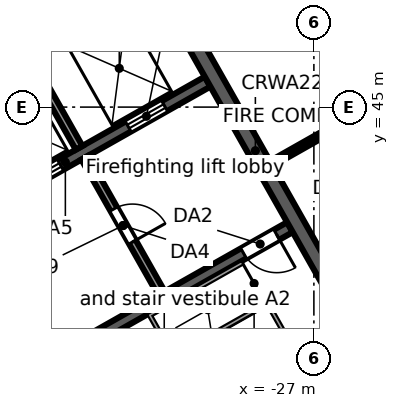
"""IFC4 building model, lengths in metres.
Left out: names, types, materials, properties, quantities, classifications, styles, units other than length and angle.
Written with IfcOpenShell. Run it as: python <this file> out.ifc"""

import sys

from ifc_helpers import new_model, si_unit, direction, frame, frame_2d, origin, place, context, subcontext, project, spatial, rectangle, extrude, element, fill, save


model = new_model("IFC4")
c1 = context("Model", 3, precision=1e-05, world=origin(), true_north=direction((0.0, 1.0)))
c2 = subcontext(c1, "Body", "Model", "MODEL_VIEW")
j1 = project(units=[si_unit("LENGTHUNIT", "METRE"), si_unit("PLANEANGLEUNIT", "RADIAN")], contexts=[c1])
p1 = place(None, origin())
s1 = spatial("IfcSite", under=j1, at=p1, CompositionType="ELEMENT")
p2 = place(p1, origin())
s2 = spatial("IfcBuilding", under=s1, at=p2, CompositionType="ELEMENT")
p3 = place(p2, frame((0.0, 0.0, 262.7)))
s3 = spatial("IfcBuildingStorey", under=s2, at=p3, CompositionType="ELEMENT", Elevation=262.7)
p4 = place(p3, frame((-58.732, 38.771, 0.0), z_axis=(0.0, 0.0, 1.0), x_axis=(0.870355615581, 0.492423702137, 0.0)))
e1 = element("IfcWall", 1, at=p4, inside=s3, PredefinedType="STANDARD", context=c2, shape_type="SweptSolid", body=[
    extrude(rectangle(XDim=64.052, YDim=0.25, at=frame_2d((32.026, 0.0))), origin(), (0.0, 0.0, 1.0), 3.52),
])
p5 = place(p4, frame((61.259, 0.0, 0.8)))
e2 = element("IfcOpeningElement", 2, at=p5, cuts=e1, PredefinedType="OPENING", context=c2, shape_type="SweptSolid", body=[
    extrude(rectangle(XDim=2.4, YDim=2.2, at=frame_2d((1.2, 1.1))), frame((0.0, 0.135, 0.0), z_axis=(0.0, -1.0, 0.0), x_axis=(1.0, 0.0, 0.0)), (0.0, 0.0, 1.0), 0.27),
])
p6 = place(p4, frame((58.216, 0.0, 0.8)))
e3 = element("IfcOpeningElement", 3, at=p6, cuts=e1, PredefinedType="OPENING", context=c2, shape_type="SweptSolid", body=[
    extrude(rectangle(XDim=2.4, YDim=2.2, at=frame_2d((1.2, 1.1))), frame((0.0, 0.135, 0.0), z_axis=(0.0, -1.0, 0.0), x_axis=(1.0, 0.0, 0.0)), (0.0, 0.0, 1.0), 0.27),
])
p7 = place(p4, frame((55.173, 0.0, 0.8)))
e4 = element("IfcOpeningElement", 4, at=p7, cuts=e1, PredefinedType="OPENING", context=c2, shape_type="SweptSolid", body=[
    extrude(rectangle(XDim=2.4, YDim=2.2, at=frame_2d((1.2, 1.1))), frame((0.0, 0.135, 0.0), z_axis=(0.0, -1.0, 0.0), x_axis=(1.0, 0.0, 0.0)), (0.0, 0.0, 1.0), 0.27),
])
p8 = place(p4, frame((52.129, 0.0, 0.8)))
e5 = element("IfcOpeningElement", 5, at=p8, cuts=e1, PredefinedType="OPENING", context=c2, shape_type="SweptSolid", body=[
    extrude(rectangle(XDim=2.4, YDim=2.2, at=frame_2d((1.2, 1.1))), frame((0.0, 0.135, 0.0), z_axis=(0.0, -1.0, 0.0), x_axis=(1.0, 0.0, 0.0)), (0.0, 0.0, 1.0), 0.27),
])
p9 = place(p4, frame((49.086, 0.0, 0.8)))
e6 = element("IfcOpeningElement", 6, at=p9, cuts=e1, PredefinedType="OPENING", context=c2, shape_type="SweptSolid", body=[
    extrude(rectangle(XDim=2.4, YDim=2.2, at=frame_2d((1.2, 1.1))), frame((0.0, 0.135, 0.0), z_axis=(0.0, -1.0, 0.0), x_axis=(1.0, 0.0, 0.0)), (0.0, 0.0, 1.0), 0.27),
])
p10 = place(p4, frame((46.043, 0.0, 0.8)))
e7 = element("IfcOpeningElement", 7, at=p10, cuts=e1, PredefinedType="OPENING", context=c2, shape_type="SweptSolid", body=[
    extrude(rectangle(XDim=2.4, YDim=2.2, at=frame_2d((1.2, 1.1))), frame((0.0, 0.135, 0.0), z_axis=(0.0, -1.0, 0.0), x_axis=(1.0, 0.0, 0.0)), (0.0, 0.0, 1.0), 0.27),
])
p11 = place(p4, frame((43.0, 0.0, 0.8)))
e8 = element("IfcOpeningElement", 8, at=p11, cuts=e1, PredefinedType="OPENING", context=c2, shape_type="SweptSolid", body=[
    extrude(rectangle(XDim=2.4, YDim=2.2, at=frame_2d((1.2, 1.1))), frame((0.0, 0.135, 0.0), z_axis=(0.0, -1.0, 0.0), x_axis=(1.0, 0.0, 0.0)), (0.0, 0.0, 1.0), 0.27),
])
p12 = place(p4, frame((39.956, 0.0, 0.8)))
e9 = element("IfcOpeningElement", 9, at=p12, cuts=e1, PredefinedType="OPENING", context=c2, shape_type="SweptSolid", body=[
    extrude(rectangle(XDim=2.4, YDim=2.2, at=frame_2d((1.2, 1.1))), frame((0.0, 0.135, 0.0), z_axis=(0.0, -1.0, 0.0), x_axis=(1.0, 0.0, 0.0)), (0.0, 0.0, 1.0), 0.27),
])
p13 = place(p4, frame((36.913, 0.0, 0.8)))
e10 = element("IfcOpeningElement", 10, at=p13, cuts=e1, PredefinedType="OPENING", context=c2, shape_type="SweptSolid", body=[
    extrude(rectangle(XDim=2.4, YDim=2.2, at=frame_2d((1.2, 1.1))), frame((0.0, 0.135, 0.0), z_axis=(0.0, -1.0, 0.0), x_axis=(1.0, 0.0, 0.0)), (0.0, 0.0, 1.0), 0.27),
])
p14 = place(p4, frame((33.87, 0.0, 0.8)))
e11 = element("IfcOpeningElement", 11, at=p14, cuts=e1, PredefinedType="OPENING", context=c2, shape_type="SweptSolid", body=[
    extrude(rectangle(XDim=2.4, YDim=2.2, at=frame_2d((1.2, 1.1))), frame((0.0, 0.135, 0.0), z_axis=(0.0, -1.0, 0.0), x_axis=(1.0, 0.0, 0.0)), (0.0, 0.0, 1.0), 0.27),
])
p15 = place(p4, frame((30.826, 0.0, 0.8)))
e12 = element("IfcOpeningElement", 12, at=p15, cuts=e1, PredefinedType="OPENING", context=c2, shape_type="SweptSolid", body=[
    extrude(rectangle(XDim=2.4, YDim=2.2, at=frame_2d((1.2, 1.1))), frame((0.0, 0.135, 0.0), z_axis=(0.0, -1.0, 0.0), x_axis=(1.0, 0.0, 0.0)), (0.0, 0.0, 1.0), 0.27),
])
p16 = place(p4, frame((27.783, 0.0, 0.8)))
e13 = element("IfcOpeningElement", 13, at=p16, cuts=e1, PredefinedType="OPENING", context=c2, shape_type="SweptSolid", body=[
    extrude(rectangle(XDim=2.4, YDim=2.2, at=frame_2d((1.2, 1.1))), frame((0.0, 0.135, 0.0), z_axis=(0.0, -1.0, 0.0), x_axis=(1.0, 0.0, 0.0)), (0.0, 0.0, 1.0), 0.27),
])
p17 = place(p4, frame((24.74, 0.0, 0.8)))
e14 = element("IfcOpeningElement", 14, at=p17, cuts=e1, PredefinedType="OPENING", context=c2, shape_type="SweptSolid", body=[
    extrude(rectangle(XDim=2.4, YDim=2.2, at=frame_2d((1.2, 1.1))), frame((0.0, 0.135, 0.0), z_axis=(0.0, -1.0, 0.0), x_axis=(1.0, 0.0, 0.0)), (0.0, 0.0, 1.0), 0.27),
])
p18 = place(p4, frame((21.696, 0.0, 0.8)))
e15 = element("IfcOpeningElement", 15, at=p18, cuts=e1, PredefinedType="OPENING", context=c2, shape_type="SweptSolid", body=[
    extrude(rectangle(XDim=2.4, YDim=2.2, at=frame_2d((1.2, 1.1))), frame((0.0, 0.135, 0.0), z_axis=(0.0, -1.0, 0.0), x_axis=(1.0, 0.0, 0.0)), (0.0, 0.0, 1.0), 0.27),
])
p19 = place(p4, frame((18.653, 0.0, 0.8)))
e16 = element("IfcOpeningElement", 16, at=p19, cuts=e1, PredefinedType="OPENING", context=c2, shape_type="SweptSolid", body=[
    extrude(rectangle(XDim=2.4, YDim=2.2, at=frame_2d((1.2, 1.1))), frame((0.0, 0.135, 0.0), z_axis=(0.0, -1.0, 0.0), x_axis=(1.0, 0.0, 0.0)), (0.0, 0.0, 1.0), 0.27),
])
p20 = place(p4, frame((15.61, 0.0, 0.8)))
e17 = element("IfcOpeningElement", 17, at=p20, cuts=e1, PredefinedType="OPENING", context=c2, shape_type="SweptSolid", body=[
    extrude(rectangle(XDim=2.4, YDim=2.2, at=frame_2d((1.2, 1.1))), frame((0.0, 0.135, 0.0), z_axis=(0.0, -1.0, 0.0), x_axis=(1.0, 0.0, 0.0)), (0.0, 0.0, 1.0), 0.27),
])
p21 = place(p4, frame((12.567, 0.0, 0.8)))
e18 = element("IfcOpeningElement", 18, at=p21, cuts=e1, PredefinedType="OPENING", context=c2, shape_type="SweptSolid", body=[
    extrude(rectangle(XDim=2.4, YDim=2.2, at=frame_2d((1.2, 1.1))), frame((0.0, 0.135, 0.0), z_axis=(0.0, -1.0, 0.0), x_axis=(1.0, 0.0, 0.0)), (0.0, 0.0, 1.0), 0.27),
])
p22 = place(p4, frame((9.523, 0.0, 0.8)))
e19 = element("IfcOpeningElement", 19, at=p22, cuts=e1, PredefinedType="OPENING", context=c2, shape_type="SweptSolid", body=[
    extrude(rectangle(XDim=2.4, YDim=2.2, at=frame_2d((1.2, 1.1))), frame((0.0, 0.135, 0.0), z_axis=(0.0, -1.0, 0.0), x_axis=(1.0, 0.0, 0.0)), (0.0, 0.0, 1.0), 0.27),
])
p23 = place(p4, frame((6.48, 0.0, 0.8)))
e20 = element("IfcOpeningElement", 20, at=p23, cuts=e1, PredefinedType="OPENING", context=c2, shape_type="SweptSolid", body=[
    extrude(rectangle(XDim=2.4, YDim=2.2, at=frame_2d((1.2, 1.1))), frame((0.0, 0.135, 0.0), z_axis=(0.0, -1.0, 0.0), x_axis=(1.0, 0.0, 0.0)), (0.0, 0.0, 1.0), 0.27),
])
p24 = place(p4, frame((3.437, 0.0, 0.8)))
e21 = element("IfcOpeningElement", 21, at=p24, cuts=e1, PredefinedType="OPENING", context=c2, shape_type="SweptSolid", body=[
    extrude(rectangle(XDim=2.4, YDim=2.2, at=frame_2d((1.2, 1.1))), frame((0.0, 0.135, 0.0), z_axis=(0.0, -1.0, 0.0), x_axis=(1.0, 0.0, 0.0)), (0.0, 0.0, 1.0), 0.27),
])
p25 = place(p4, frame((0.393, 0.0, 0.8)))
e22 = element("IfcOpeningElement", 22, at=p25, cuts=e1, PredefinedType="OPENING", context=c2, shape_type="SweptSolid", body=[
    extrude(rectangle(XDim=2.4, YDim=2.2, at=frame_2d((1.2, 1.1))), frame((0.0, 0.135, 0.0), z_axis=(0.0, -1.0, 0.0), x_axis=(1.0, 0.0, 0.0)), (0.0, 0.0, 1.0), 0.27),
])
p26 = place(p3, frame((-3.017, 46.293, 0.0), z_axis=(0.0, 0.0, 1.0), x_axis=(-0.870355474887, -0.492423950812, 0.0)))
e23 = element("IfcWall", 23, at=p26, inside=s3, PredefinedType="STANDARD", context=c2, shape_type="SweptSolid", body=[
    extrude(rectangle(XDim=40.34, YDim=0.25, at=frame_2d((20.17, 0.0))), origin(), (0.0, 0.0, 1.0), 3.52),
])
p27 = place(p26, frame((37.428, 0.0, 0.8)))
e24 = element("IfcOpeningElement", 24, at=p27, cuts=e23, PredefinedType="OPENING", context=c2, shape_type="SweptSolid", body=[
    extrude(rectangle(XDim=2.4, YDim=2.2, at=frame_2d((1.2, 1.1))), frame((0.0, 0.135, 0.0), z_axis=(0.0, -1.0, 0.0), x_axis=(1.0, 0.0, 0.0)), (0.0, 0.0, 1.0), 0.27),
])
p28 = place(p26, frame((34.372, 0.0, 0.0)))
e25 = element("IfcOpeningElement", 25, at=p28, cuts=e23, PredefinedType="OPENING", context=c2, shape_type="SweptSolid", body=[
    extrude(rectangle(XDim=1.8, YDim=2.4, at=frame_2d((0.9, 1.2))), frame((0.0, 0.135, 0.0), z_axis=(0.0, -1.0, 0.0), x_axis=(1.0, 0.0, 0.0)), (0.0, 0.0, 1.0), 0.27),
])
p29 = place(p26, frame((30.716, 0.0, 0.8)))
e26 = element("IfcOpeningElement", 26, at=p29, cuts=e23, PredefinedType="OPENING", context=c2, shape_type="SweptSolid", body=[
    extrude(rectangle(XDim=2.4, YDim=2.2, at=frame_2d((1.2, 1.1))), frame((0.0, 0.135, 0.0), z_axis=(0.0, -1.0, 0.0), x_axis=(1.0, 0.0, 0.0)), (0.0, 0.0, 1.0), 0.27),
])
p30 = place(p26, frame((27.36, 0.0, 0.8)))
e27 = element("IfcOpeningElement", 27, at=p30, cuts=e23, PredefinedType="OPENING", context=c2, shape_type="SweptSolid", body=[
    extrude(rectangle(XDim=2.4, YDim=2.2, at=frame_2d((1.2, 1.1))), frame((0.0, 0.135, 0.0), z_axis=(0.0, -1.0, 0.0), x_axis=(1.0, 0.0, 0.0)), (0.0, 0.0, 1.0), 0.27),
])
p31 = place(p26, frame((24.304, 0.0, 0.0)))
e28 = element("IfcOpeningElement", 28, at=p31, cuts=e23, PredefinedType="OPENING", context=c2, shape_type="SweptSolid", body=[
    extrude(rectangle(XDim=1.8, YDim=2.4, at=frame_2d((0.9, 1.2))), frame((0.0, 0.135, 0.0), z_axis=(0.0, -1.0, 0.0), x_axis=(1.0, 0.0, 0.0)), (0.0, 0.0, 1.0), 0.27),
])
p32 = place(p26, frame((20.648, 0.0, 0.8)))
e29 = element("IfcOpeningElement", 29, at=p32, cuts=e23, PredefinedType="OPENING", context=c2, shape_type="SweptSolid", body=[
    extrude(rectangle(XDim=2.4, YDim=2.2, at=frame_2d((1.2, 1.1))), frame((0.0, 0.135, 0.0), z_axis=(0.0, -1.0, 0.0), x_axis=(1.0, 0.0, 0.0)), (0.0, 0.0, 1.0), 0.27),
])
p33 = place(p26, frame((17.292, 0.0, 0.8)))
e30 = element("IfcOpeningElement", 30, at=p33, cuts=e23, PredefinedType="OPENING", context=c2, shape_type="SweptSolid", body=[
    extrude(rectangle(XDim=2.4, YDim=2.2, at=frame_2d((1.2, 1.1))), frame((0.0, 0.135, 0.0), z_axis=(0.0, -1.0, 0.0), x_axis=(1.0, 0.0, 0.0)), (0.0, 0.0, 1.0), 0.27),
])
p34 = place(p26, frame((14.236, 0.0, 0.0)))
e31 = element("IfcOpeningElement", 31, at=p34, cuts=e23, PredefinedType="OPENING", context=c2, shape_type="SweptSolid", body=[
    extrude(rectangle(XDim=1.8, YDim=2.4, at=frame_2d((0.9, 1.2))), frame((0.0, 0.135, 0.0), z_axis=(0.0, -1.0, 0.0), x_axis=(1.0, 0.0, 0.0)), (0.0, 0.0, 1.0), 0.27),
])
p35 = place(p26, frame((10.58, 0.0, 0.8)))
e32 = element("IfcOpeningElement", 32, at=p35, cuts=e23, PredefinedType="OPENING", context=c2, shape_type="SweptSolid", body=[
    extrude(rectangle(XDim=2.4, YDim=2.2, at=frame_2d((1.2, 1.1))), frame((0.0, 0.135, 0.0), z_axis=(0.0, -1.0, 0.0), x_axis=(1.0, 0.0, 0.0)), (0.0, 0.0, 1.0), 0.27),
])
p36 = place(p26, frame((7.224, 0.0, 0.8)))
e33 = element("IfcOpeningElement", 33, at=p36, cuts=e23, PredefinedType="OPENING", context=c2, shape_type="SweptSolid", body=[
    extrude(rectangle(XDim=2.4, YDim=2.2, at=frame_2d((1.2, 1.1))), frame((0.0, 0.135, 0.0), z_axis=(0.0, -1.0, 0.0), x_axis=(1.0, 0.0, 0.0)), (0.0, 0.0, 1.0), 0.27),
])
p37 = place(p26, frame((4.168, 0.0, 0.0)))
e34 = element("IfcOpeningElement", 34, at=p37, cuts=e23, PredefinedType="OPENING", context=c2, shape_type="SweptSolid", body=[
    extrude(rectangle(XDim=1.8, YDim=2.4, at=frame_2d((0.9, 1.2))), frame((0.0, 0.135, 0.0), z_axis=(0.0, -1.0, 0.0), x_axis=(1.0, 0.0, 0.0)), (0.0, 0.0, 1.0), 0.27),
])
p38 = place(p26, frame((0.512, 0.0, 0.8)))
e35 = element("IfcOpeningElement", 35, at=p38, cuts=e23, PredefinedType="OPENING", context=c2, shape_type="SweptSolid", body=[
    extrude(rectangle(XDim=2.4, YDim=2.2, at=frame_2d((1.2, 1.1))), frame((0.0, 0.135, 0.0), z_axis=(0.0, -1.0, 0.0), x_axis=(1.0, 0.0, 0.0)), (0.0, 0.0, 1.0), 0.27),
])
p39 = place(p3, frame((-34.245, 38.097, 0.0), z_axis=(0.0, 0.0, 1.0), x_axis=(0.870356351998, 0.492422400523, 0.0)))
e36 = element("IfcWall", 36, at=p39, inside=s3, PredefinedType="SOLIDWALL", context=c2, shape_type="SweptSolid", body=[
    extrude(rectangle(XDim=7.6, YDim=0.3, at=frame_2d((3.8, 0.0))), origin(), (0.0, 0.0, 1.0), 3.52),
])
p40 = place(p39, frame((6.2, 0.0, 0.0)))
e37 = element("IfcOpeningElement", 37, at=p40, cuts=e36, PredefinedType="OPENING", context=c2, shape_type="SweptSolid", body=[
    extrude(rectangle(XDim=1.0, YDim=2.1, at=frame_2d((0.5, 1.05))), frame((0.0, 0.16, 0.0), z_axis=(0.0, -1.0, 0.0), x_axis=(1.0, 0.0, 0.0)), (0.0, 0.0, 1.0), 0.32),
])
p41 = place(p3, frame((-37.282, 41.435, 0.0), z_axis=(0.0, 0.0, 1.0), x_axis=(0.870361315115, 0.492413628113, 0.0)))
e38 = element("IfcWall", 38, at=p41, inside=s3, PredefinedType="SOLIDWALL", context=c2, shape_type="SweptSolid", body=[
    extrude(rectangle(XDim=8.6, YDim=0.3, at=frame_2d((4.3, 0.0))), origin(), (0.0, 0.0, 1.0), 3.52),
])
p42 = place(p41, frame((0.65, 0.0, 0.0)))
e39 = element("IfcOpeningElement", 39, at=p42, cuts=e38, PredefinedType="OPENING", context=c2, shape_type="SweptSolid", body=[
    extrude(rectangle(XDim=1.1, YDim=2.1, at=frame_2d((0.55, 1.05))), frame((0.0, 0.16, 0.0), z_axis=(0.0, -1.0, 0.0), x_axis=(1.0, 0.0, 0.0)), (0.0, 0.0, 1.0), 0.32),
])
p43 = place(p41, frame((3.05, 0.0, 0.0)))
e40 = element("IfcOpeningElement", 40, at=p43, cuts=e38, PredefinedType="OPENING", context=c2, shape_type="SweptSolid", body=[
    extrude(rectangle(XDim=1.1, YDim=2.1, at=frame_2d((0.55, 1.05))), frame((0.0, 0.16, 0.0), z_axis=(0.0, -1.0, 0.0), x_axis=(1.0, 0.0, 0.0)), (0.0, 0.0, 1.0), 0.32),
])
p44 = place(p41, frame((6.2, 0.0, 0.0)))
e41 = element("IfcOpeningElement", 41, at=p44, cuts=e38, PredefinedType="OPENING", context=c2, shape_type="SweptSolid", body=[
    extrude(rectangle(XDim=1.1, YDim=2.1, at=frame_2d((0.55, 1.05))), frame((0.0, 0.16, 0.0), z_axis=(0.0, -1.0, 0.0), x_axis=(1.0, 0.0, 0.0)), (0.0, 0.0, 1.0), 0.32),
])
p45 = place(p3, frame((-46.51, 41.499, 0.0), z_axis=(0.0, 0.0, 1.0), x_axis=(0.870356271124, 0.492422543467, 0.0)))
e42 = element("IfcWall", 42, at=p45, inside=s3, PredefinedType="SOLIDWALL", context=c2, shape_type="SweptSolid", body=[
    extrude(rectangle(XDim=17.0, YDim=0.4, at=frame_2d((8.5, 0.0))), origin(), (0.0, 0.0, 1.0), 3.52),
])
p46 = place(p3, frame((-33.031, 43.667, 0.0), z_axis=(0.0, 0.0, 1.0), x_axis=(0.492408451753, -0.87036424366, 0.0)))
e43 = element("IfcWall", 43, at=p46, inside=s3, PredefinedType="PARTITIONING", context=c2, shape_type="SweptSolid", body=[
    extrude(rectangle(XDim=4.1, YDim=0.2, at=frame_2d((2.05, 0.0))), origin(), (0.0, 0.0, 1.0), 3.52),
])
p47 = place(p46, frame((1.55, 0.0, 0.0)))
e44 = element("IfcOpeningElement", 44, at=p47, cuts=e43, PredefinedType="OPENING", context=c2, shape_type="SweptSolid", body=[
    extrude(rectangle(XDim=1.0, YDim=2.1, at=frame_2d((0.5, 1.05))), frame((0.0, 0.11, 0.0), z_axis=(0.0, -1.0, 0.0), x_axis=(1.0, 0.0, 0.0)), (0.0, 0.0, 1.0), 0.22),
])
p48 = place(p3, frame((-35.271, 47.628, 0.0), z_axis=(0.0, 0.0, 1.0), x_axis=(0.492422543467, -0.870356271124, 0.0)))
e45 = element("IfcWall", 45, at=p48, inside=s3, PredefinedType="SOLIDWALL", context=c2, shape_type="SweptSolid", body=[
    extrude(rectangle(XDim=4.25, YDim=0.2, at=frame_2d((2.125, 0.0))), origin(), (0.0, 0.0, 1.0), 3.52),
])
p49 = place(p3, frame((-31.79, 49.597, 0.0), z_axis=(0.0, 0.0, 1.0), x_axis=(0.492421663121, -0.870356769198, 0.0)))
e46 = element("IfcWall", 46, at=p49, inside=s3, PredefinedType="SOLIDWALL", context=c2, shape_type="SweptSolid", body=[
    extrude(rectangle(XDim=13.2, YDim=0.4, at=frame_2d((6.6, 0.0))), origin(), (0.0, 0.0, 1.0), 3.52),
])
p50 = place(p3, frame((-28.119, 43.516, 0.0), z_axis=(0.0, 0.0, 1.0), x_axis=(0.870310250913, 0.49250387527, 0.0)))
e47 = element("IfcWall", 47, at=p50, inside=s3, PredefinedType="PARTITIONING", context=c2, shape_type="SweptSolid", body=[
    extrude(rectangle(XDim=6.25, YDim=0.15, at=frame_2d((3.125, 0.0))), origin(), (0.0, 0.0, 1.0), 2.792),
])
p51 = place(p43, origin())
e48 = element("IfcDoor", 48, at=p51, inside=s3, OperationType="DOUBLE_DOOR_SLIDING", PredefinedType="DOOR", context=c2, shape_type="SweptSolid", body=[
    extrude(rectangle(XDim=1.1, YDim=2.1, at=frame_2d((0.55, 1.05))), frame((0.0, 0.025, 0.0), z_axis=(0.0, -1.0, 0.0), x_axis=(1.0, 0.0, 0.0)), (0.0, 0.0, 1.0), 0.05),
])
fill(e40, e48)
p52 = place(p44, origin())
e49 = element("IfcDoor", 49, at=p52, inside=s3, OperationType="DOUBLE_DOOR_SLIDING", PredefinedType="DOOR", context=c2, shape_type="SweptSolid", body=[
    extrude(rectangle(XDim=1.1, YDim=2.1, at=frame_2d((0.55, 1.05))), frame((0.0, 0.025, 0.0), z_axis=(0.0, -1.0, 0.0), x_axis=(1.0, 0.0, 0.0)), (0.0, 0.0, 1.0), 0.05),
])
fill(e41, e49)
p53 = place(p40, frame((1.0, 0.0, 0.0), z_axis=(0.0, 0.0, 1.0), x_axis=(-1.0, 0.0, 0.0)))
e50 = element("IfcDoor", 50, at=p53, inside=s3, OperationType="SINGLE_SWING_LEFT", PredefinedType="DOOR", context=c2, shape_type="SweptSolid", body=[
    extrude(rectangle(XDim=1.0, YDim=2.1, at=frame_2d((0.5, 1.05))), frame((0.0, 0.025, 0.0), z_axis=(0.0, -1.0, 0.0), x_axis=(1.0, 0.0, 0.0)), (0.0, 0.0, 1.0), 0.05),
])
fill(e37, e50)
p54 = place(p47, origin())
e51 = element("IfcDoor", 51, at=p54, inside=s3, OperationType="SINGLE_SWING_RIGHT", PredefinedType="DOOR", context=c2, shape_type="SweptSolid", body=[
    extrude(rectangle(XDim=1.0, YDim=2.1, at=frame_2d((0.5, 1.05))), frame((0.0, 0.025, 0.0), z_axis=(0.0, -1.0, 0.0), x_axis=(1.0, 0.0, 0.0)), (0.0, 0.0, 1.0), 0.05),
])
fill(e44, e51)
save(model, sys.argv[1])
